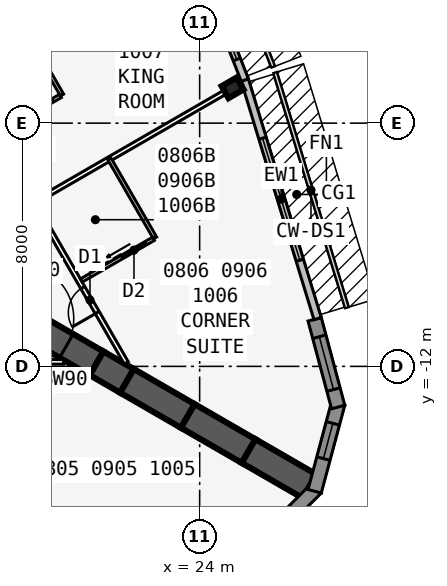
"""IFC4 building model, lengths in metres.
Left out: names, types, materials, properties, quantities, classifications, styles, units other than length and angle.
Written with IfcOpenShell. Run it as: python <this file> out.ifc"""

import sys

from ifc_helpers import new_model, si_unit, direction, frame, frame_2d, origin, origin_2d, place, context, subcontext, project, spatial, polyline, rectangle, i_section, outline, extrude, element, fill, save


model = new_model("IFC4")
c1 = context("Model", 3, precision=1e-05, world=origin(), true_north=direction((0.0, 1.0)))
c2 = subcontext(c1, "Body", "Model", "MODEL_VIEW")
j1 = project(units=[si_unit("LENGTHUNIT", "METRE"), si_unit("PLANEANGLEUNIT", "RADIAN")], contexts=[c1])
p1 = place(None, origin())
s1 = spatial("IfcSite", under=j1, at=p1, CompositionType="ELEMENT")
p2 = place(p1, origin())
s2 = spatial("IfcBuilding", under=s1, at=p2, CompositionType="ELEMENT")
p3 = place(p2, frame((0.0, 0.0, 38.7)))
s3 = spatial("IfcBuildingStorey", under=s2, at=p3, CompositionType="ELEMENT", Elevation=38.7)
p4 = place(p3, frame((16.5, -9.526, 0.0), z_axis=(0.0, 0.0, 1.0), x_axis=(0.866031398331, -0.499989616998, 0.0)))
e1 = element("IfcWall", 1, at=p4, inside=s3, PredefinedType="SHEAR", context=c2, shape_type="SweptSolid", body=[
    extrude(rectangle(XDim=4.746, YDim=0.9, at=frame_2d((2.373, 0.0))), origin(), (0.0, 0.0, 1.0), 3.4),
])
p5 = place(p4, frame((1.8, 0.0, 0.0)))
e2 = element("IfcOpeningElement", 2, at=p5, cuts=e1, PredefinedType="OPENING", context=c2, shape_type="SweptSolid", body=[
    extrude(rectangle(XDim=1.8, YDim=2.13, at=frame_2d((0.9, 1.065))), frame((0.0, 0.46, 0.0), z_axis=(0.0, -1.0, 0.0), x_axis=(1.0, 0.0, 0.0)), (0.0, 0.0, 1.0), 0.92),
])
p6 = place(p3, frame((20.61, -11.899, 0.0), z_axis=(0.0, 0.0, 1.0), x_axis=(0.866009537788, -0.500027479704, 0.0)))
e3 = element("IfcWall", 3, at=p6, inside=s3, PredefinedType="SHEAR", context=c2, shape_type="SweptSolid", body=[
    extrude(rectangle(XDim=1.155, YDim=0.9, at=frame_2d((0.577, 0.0))), origin(), (0.0, 0.0, 1.0), 3.4),
])
for number, where, z_axis, x_axis in (
    (4, (21.61, -12.477, 0.0), (0.0, 0.0, 1.0), (0.866, -0.5, 0.0)),
    (5, (23.61, -13.631, 0.0), (0.0, 0.0, 1.0), (0.866, -0.5, 0.0)),
    (6, (25.61, -14.786, 0.0), (0.0, 0.0, 1.0), (0.866, -0.5, 0.0)),
):
    element("IfcWall", number, at=place(p3, frame(where, z_axis=z_axis, x_axis=x_axis)), inside=s3, PredefinedType="SHEAR", context=c2, shape_type="SweptSolid", body=[
        extrude(rectangle(XDim=2.309, YDim=0.9, at=frame_2d((1.155, 0.0))), origin(), (0.0, 0.0, 1.0), 3.4),
    ])
p7 = place(p3, frame((25.083, -2.839, 0.0), z_axis=(0.0, 0.0, 1.0), x_axis=(-0.5, 0.866025403784, 0.0)))
e7 = element("IfcColumn", 7, at=p7, inside=s3, PredefinedType="COLUMN", context=c2, shape_type="SweptSolid", body=[
    extrude(i_section(OverallWidth=0.455, OverallDepth=0.569, WebThickness=0.078, FlangeThickness=0.125, at=origin_2d()), origin(), (0.0, 0.0, 1.0), 3.4),
])
p8 = place(p3, frame((25.728, -18.12, 0.0), z_axis=(0.0, 0.0, 1.0), x_axis=(0.707025086683, 0.707188466253, 0.0)))
e8 = element("IfcWall", 8, at=p8, inside=s3, PredefinedType="SOLIDWALL", context=c2, shape_type="SweptSolid", body=[
    extrude(outline(polyline([(2.989, 0.225), (2.93, 0.225), (2.438, 0.093), (2.402, 0.225), (0.0, 0.225), (0.0, -0.225), (2.989, -0.225), (2.989, 0.225)])), origin(), (0.0, 0.0, 1.0), 3.235),
])
p9 = place(p8, frame((0.676, 0.0, 0.45)))
e9 = element("IfcOpeningElement", 9, at=p9, cuts=e8, PredefinedType="OPENING", context=c2, shape_type="SweptSolid", body=[
    extrude(rectangle(XDim=1.2, YDim=2.4, at=frame_2d((0.6, 1.2))), frame((0.0, 0.235, 0.0), z_axis=(0.0, -1.0, 0.0), x_axis=(1.0, 0.0, 0.0)), (0.0, 0.0, 1.0), 0.47),
])
p10 = place(p3, frame((27.783, -16.108, 0.0), z_axis=(0.0, 0.0, 1.0), x_axis=(0.258801419081, 0.965930548995, 0.0)))
e10 = element("IfcWall", 10, at=p10, inside=s3, PredefinedType="SOLIDWALL", context=c2, shape_type="SweptSolid", body=[
    extrude(outline(polyline([(2.989, 0.225), (0.586, 0.225), (0.551, 0.093), (0.06, 0.225), (0.0, 0.225), (0.0, -0.225), (2.989, -0.225), (2.989, 0.225)])), origin(), (0.0, 0.0, 1.0), 3.235),
])
p11 = place(p10, frame((1.113, 0.0, 0.45)))
e11 = element("IfcOpeningElement", 11, at=p11, cuts=e10, PredefinedType="OPENING", context=c2, shape_type="SweptSolid", body=[
    extrude(rectangle(XDim=1.2, YDim=2.4, at=frame_2d((0.6, 1.2))), frame((0.0, 0.235, 0.0), z_axis=(0.0, -1.0, 0.0), x_axis=(1.0, 0.0, 0.0)), (0.0, 0.0, 1.0), 0.47),
])
p12 = place(p3, frame((28.556, -13.337, 0.0), z_axis=(0.0, 0.0, 1.0), x_axis=(-0.258780998834, 0.965936019953, 0.0)))
e12 = element("IfcWall", 12, at=p12, inside=s3, PredefinedType="SOLIDWALL", context=c2, shape_type="SweptSolid", body=[
    extrude(rectangle(XDim=2.989, YDim=0.45, at=frame_2d((1.494, 0.0))), origin(), (0.0, 0.0, 1.0), 3.235),
])
p13 = place(p12, frame((0.594, 0.0, 0.45)))
e13 = element("IfcOpeningElement", 13, at=p13, cuts=e12, PredefinedType="OPENING", context=c2, shape_type="SweptSolid", body=[
    extrude(rectangle(XDim=1.8, YDim=2.4, at=frame_2d((0.9, 1.2))), frame((0.0, 0.235, 0.0), z_axis=(0.0, -1.0, 0.0), x_axis=(1.0, 0.0, 0.0)), (0.0, 0.0, 1.0), 0.47),
])
p14 = place(p3, frame((27.88, -10.429, 0.0), z_axis=(0.0, 0.0, 1.0), x_axis=(-0.2919790669, 0.956424709265, 0.0)))
e14 = element("IfcWall", 14, at=p14, inside=s3, PredefinedType="STANDARD", context=c2, shape_type="SweptSolid", body=[
    extrude(rectangle(XDim=8.211, YDim=0.25, at=frame_2d((4.105, 0.0))), origin(), (0.0, 0.0, 1.0), 3.235),
])
p15 = place(p14, frame((2.006, 0.0, 0.45)))
e15 = element("IfcOpeningElement", 15, at=p15, cuts=e14, PredefinedType="OPENING", context=c2, shape_type="SweptSolid", body=[
    extrude(rectangle(XDim=4.2, YDim=2.4, at=frame_2d((2.1, 1.2))), frame((0.0, 0.135, 0.0), z_axis=(0.0, -1.0, 0.0), x_axis=(1.0, 0.0, 0.0)), (0.0, 0.0, 1.0), 0.27),
])
p16 = place(p3, frame((25.486, -2.584, 0.0), z_axis=(0.0, 0.0, 1.0), x_axis=(-0.364013463868, 0.931393685894, 0.0)))
e16 = element("IfcWall", 16, at=p16, inside=s3, PredefinedType="STANDARD", context=c2, shape_type="SweptSolid", body=[
    extrude(rectangle(XDim=5.058, YDim=0.25, at=frame_2d((2.529, 0.0))), origin(), (0.0, 0.0, 1.0), 3.235),
])
p17 = place(p16, frame((0.729, 0.0, 0.45)))
e17 = element("IfcOpeningElement", 17, at=p17, cuts=e16, PredefinedType="OPENING", context=c2, shape_type="SweptSolid", body=[
    extrude(rectangle(XDim=3.6, YDim=2.4, at=frame_2d((1.8, 1.2))), frame((0.0, 0.135, 0.0), z_axis=(0.0, -1.0, 0.0), x_axis=(1.0, 0.0, 0.0)), (0.0, 0.0, 1.0), 0.27),
])
p18 = place(p3, frame((-19.527, -11.851, 0.0), z_axis=(0.0, 0.0, 1.0), x_axis=(1.0, 0.0, 0.0)))
e18 = element("IfcWall", 18, at=p18, inside=s3, PredefinedType="PARTITIONING", context=c2, shape_type="SweptSolid", body=[
    extrude(rectangle(XDim=39.054, YDim=0.15, at=frame_2d((19.527, 0.0))), origin(), (0.0, 0.0, 1.0), 3.235),
])
p19 = place(p18, frame((0.352, 0.0, 0.0)))
e19 = element("IfcOpeningElement", 19, at=p19, cuts=e18, PredefinedType="OPENING", context=c2, shape_type="SweptSolid", body=[
    extrude(rectangle(XDim=0.95, YDim=2.13, at=frame_2d((0.475, 1.065))), frame((0.0, 0.085, 0.0), z_axis=(0.0, -1.0, 0.0), x_axis=(1.0, 0.0, 0.0)), (0.0, 0.0, 1.0), 0.17),
])
p20 = place(p18, frame((5.352, 0.0, 0.0)))
e20 = element("IfcOpeningElement", 20, at=p20, cuts=e18, PredefinedType="OPENING", context=c2, shape_type="SweptSolid", body=[
    extrude(rectangle(XDim=0.95, YDim=2.13, at=frame_2d((0.475, 1.065))), frame((0.0, 0.085, 0.0), z_axis=(0.0, -1.0, 0.0), x_axis=(1.0, 0.0, 0.0)), (0.0, 0.0, 1.0), 0.17),
])
p21 = place(p18, frame((12.752, 0.0, 0.0)))
e21 = element("IfcOpeningElement", 21, at=p21, cuts=e18, PredefinedType="OPENING", context=c2, shape_type="SweptSolid", body=[
    extrude(rectangle(XDim=0.95, YDim=2.13, at=frame_2d((0.475, 1.065))), frame((0.0, 0.085, 0.0), z_axis=(0.0, -1.0, 0.0), x_axis=(1.0, 0.0, 0.0)), (0.0, 0.0, 1.0), 0.17),
])
p22 = place(p18, frame((21.527, 0.0, 0.0)))
e22 = element("IfcOpeningElement", 22, at=p22, cuts=e18, PredefinedType="OPENING", context=c2, shape_type="SweptSolid", body=[
    extrude(rectangle(XDim=1.0, YDim=2.13, at=frame_2d((0.5, 1.065))), frame((0.0, 0.085, 0.0), z_axis=(0.0, -1.0, 0.0), x_axis=(1.0, 0.0, 0.0)), (0.0, 0.0, 1.0), 0.17),
])
p23 = place(p18, frame((25.952, 0.0, 0.0)))
e23 = element("IfcOpeningElement", 23, at=p23, cuts=e18, PredefinedType="OPENING", context=c2, shape_type="SweptSolid", body=[
    extrude(rectangle(XDim=0.95, YDim=2.13, at=frame_2d((0.475, 1.065))), frame((0.0, 0.085, 0.0), z_axis=(0.0, -1.0, 0.0), x_axis=(1.0, 0.0, 0.0)), (0.0, 0.0, 1.0), 0.17),
])
p24 = place(p18, frame((36.546, 0.0, 0.0)))
e24 = element("IfcOpeningElement", 24, at=p24, cuts=e18, PredefinedType="OPENING", context=c2, shape_type="SweptSolid", body=[
    extrude(rectangle(XDim=0.95, YDim=2.13, at=frame_2d((0.475, 1.065))), frame((0.0, 0.085, 0.0), z_axis=(0.0, -1.0, 0.0), x_axis=(1.0, 0.0, 0.0)), (0.0, 0.0, 1.0), 0.17),
])
p25 = place(p3, frame((21.586, -11.885, 0.0), z_axis=(0.0, 0.0, 1.0), x_axis=(-0.500001915564, 0.86602429783, 0.0)))
e25 = element("IfcWall", 25, at=p25, inside=s3, PredefinedType="PARTITIONING", context=c2, shape_type="SweptSolid", body=[
    extrude(rectangle(XDim=42.172, YDim=0.15, at=frame_2d((21.086, 0.0))), origin(), (0.0, 0.0, 1.0), 3.235),
])
p26 = place(p25, frame((1.911, 0.0, 0.0)))
e26 = element("IfcOpeningElement", 26, at=p26, cuts=e25, PredefinedType="OPENING", context=c2, shape_type="SweptSolid", body=[
    extrude(rectangle(XDim=0.95, YDim=2.13, at=frame_2d((0.475, 1.065))), frame((0.0, 0.085, 0.0), z_axis=(0.0, -1.0, 0.0), x_axis=(1.0, 0.0, 0.0)), (0.0, 0.0, 1.0), 0.17),
])
p27 = place(p25, frame((7.511, 0.0, 0.0)))
e27 = element("IfcOpeningElement", 27, at=p27, cuts=e25, PredefinedType="OPENING", context=c2, shape_type="SweptSolid", body=[
    extrude(rectangle(XDim=0.95, YDim=2.13, at=frame_2d((0.475, 1.065))), frame((0.0, 0.085, 0.0), z_axis=(0.0, -1.0, 0.0), x_axis=(1.0, 0.0, 0.0)), (0.0, 0.0, 1.0), 0.17),
])
p28 = place(p25, frame((13.711, 0.0, 0.0)))
e28 = element("IfcOpeningElement", 28, at=p28, cuts=e25, PredefinedType="OPENING", context=c2, shape_type="SweptSolid", body=[
    extrude(rectangle(XDim=0.95, YDim=2.13, at=frame_2d((0.475, 1.065))), frame((0.0, 0.085, 0.0), z_axis=(0.0, -1.0, 0.0), x_axis=(1.0, 0.0, 0.0)), (0.0, 0.0, 1.0), 0.17),
])
p29 = place(p25, frame((21.911, 0.0, 0.0)))
e29 = element("IfcOpeningElement", 29, at=p29, cuts=e25, PredefinedType="OPENING", context=c2, shape_type="SweptSolid", body=[
    extrude(rectangle(XDim=0.95, YDim=2.13, at=frame_2d((0.475, 1.065))), frame((0.0, 0.085, 0.0), z_axis=(0.0, -1.0, 0.0), x_axis=(1.0, 0.0, 0.0)), (0.0, 0.0, 1.0), 0.17),
])
p30 = place(p25, frame((28.711, 0.0, 0.0)))
e30 = element("IfcOpeningElement", 30, at=p30, cuts=e25, PredefinedType="OPENING", context=c2, shape_type="SweptSolid", body=[
    extrude(rectangle(XDim=0.95, YDim=2.13, at=frame_2d((0.475, 1.065))), frame((0.0, 0.085, 0.0), z_axis=(0.0, -1.0, 0.0), x_axis=(1.0, 0.0, 0.0)), (0.0, 0.0, 1.0), 0.17),
])
p31 = place(p25, frame((31.911, 0.0, 0.0)))
e31 = element("IfcOpeningElement", 31, at=p31, cuts=e25, PredefinedType="OPENING", context=c2, shape_type="SweptSolid", body=[
    extrude(rectangle(XDim=0.95, YDim=2.13, at=frame_2d((0.475, 1.065))), frame((0.0, 0.085, 0.0), z_axis=(0.0, -1.0, 0.0), x_axis=(1.0, 0.0, 0.0)), (0.0, 0.0, 1.0), 0.17),
])
p32 = place(p25, frame((39.311, 0.0, 0.0)))
e32 = element("IfcOpeningElement", 32, at=p32, cuts=e25, PredefinedType="OPENING", context=c2, shape_type="SweptSolid", body=[
    extrude(rectangle(XDim=0.95, YDim=2.13, at=frame_2d((0.475, 1.065))), frame((0.0, 0.085, 0.0), z_axis=(0.0, -1.0, 0.0), x_axis=(1.0, 0.0, 0.0)), (0.0, 0.0, 1.0), 0.17),
])
p33 = place(p3, frame((18.608, -6.577, 0.0), z_axis=(0.0, 0.0, 1.0), x_axis=(0.866034818847, 0.499983692279, 0.0)))
e33 = element("IfcWall", 33, at=p33, inside=s3, PredefinedType="PARTITIONING", context=c2, shape_type="SweptSolid", body=[
    extrude(rectangle(XDim=7.82, YDim=0.15, at=frame_2d((3.91, 0.0))), origin(), (0.0, 0.0, 1.0), 2.389),
])
p34 = place(p3, frame((16.108, -2.247, 0.0), z_axis=(0.0, 0.0, 1.0), x_axis=(0.866018881988, 0.500011295912, 0.0)))
e34 = element("IfcWall", 34, at=p34, inside=s3, PredefinedType="PARTITIONING", context=c2, shape_type="SweptSolid", body=[
    extrude(rectangle(XDim=8.585, YDim=0.15, at=frame_2d((4.292, 0.0))), origin(), (0.0, 0.0, 1.0), 2.389),
])
p35 = place(p3, frame((22.533, -7.775, 0.0), z_axis=(0.0, 0.0, 1.0), x_axis=(-0.499990139034, 0.866031096941, 0.0)))
e35 = element("IfcWall", 35, at=p35, inside=s3, PredefinedType="PLUMBINGWALL", context=c2, shape_type="SweptSolid", body=[
    extrude(rectangle(XDim=3.0, YDim=0.12, at=frame_2d((1.5, 0.0))), origin(), (0.0, 0.0, 1.0), 3.235),
])
p36 = place(p3, frame((20.108, -9.175, 0.0), z_axis=(0.0, 0.0, 1.0), x_axis=(0.866035715982, 0.499982138324, 0.0)))
e36 = element("IfcWall", 36, at=p36, inside=s3, PredefinedType="PLUMBINGWALL", context=c2, shape_type="SweptSolid", body=[
    extrude(rectangle(XDim=2.74, YDim=0.12, at=frame_2d((1.37, 0.0))), origin(), (0.0, 0.0, 1.0), 3.235),
])
p37 = place(p36, frame((1.55, 0.0, 0.0)))
e37 = element("IfcOpeningElement", 37, at=p37, cuts=e36, PredefinedType="OPENING", context=c2, shape_type="SweptSolid", body=[
    extrude(rectangle(XDim=0.9, YDim=2.13, at=frame_2d((0.45, 1.065))), frame((0.0, 0.07, 0.0), z_axis=(0.0, -1.0, 0.0), x_axis=(1.0, 0.0, 0.0)), (0.0, 0.0, 1.0), 0.14),
])
p38 = place(p3, frame((19.473, -3.076, 0.0), z_axis=(0.0, 0.0, 1.0), x_axis=(-0.499957262057, 0.866050077142, 0.0)))
e38 = element("IfcWall", 38, at=p38, inside=s3, PredefinedType="PLUMBINGWALL", context=c2, shape_type="SweptSolid", body=[
    extrude(rectangle(XDim=2.4, YDim=0.12, at=frame_2d((1.2, 0.0))), origin(), (0.0, 0.0, 1.0), 3.235),
])
p39 = place(p3, frame((17.308, -4.326, 0.0), z_axis=(0.0, 0.0, 1.0), x_axis=(0.866023955769, 0.500002508028, 0.0)))
e39 = element("IfcWall", 39, at=p39, inside=s3, PredefinedType="PLUMBINGWALL", context=c2, shape_type="SweptSolid", body=[
    extrude(rectangle(XDim=2.44, YDim=0.12, at=frame_2d((1.22, 0.0))), origin(), (0.0, 0.0, 1.0), 3.235),
])
p40 = place(p39, frame((1.25, 0.0, 0.0)))
e40 = element("IfcOpeningElement", 40, at=p40, cuts=e39, PredefinedType="OPENING", context=c2, shape_type="SweptSolid", body=[
    extrude(rectangle(XDim=0.9, YDim=2.13, at=frame_2d((0.45, 1.065))), frame((0.0, 0.07, 0.0), z_axis=(0.0, -1.0, 0.0), x_axis=(1.0, 0.0, 0.0)), (0.0, 0.0, 1.0), 0.14),
])
p41 = place(p11, origin())
e41 = element("IfcWindow", 41, at=p41, inside=s3, PartitioningType="SINGLE_PANEL", PredefinedType="WINDOW", context=c2, shape_type="SweptSolid", body=[
    extrude(rectangle(XDim=1.2, YDim=2.4, at=frame_2d((0.6, 1.2))), frame((0.0, 0.03, 0.0), z_axis=(0.0, -1.0, 0.0), x_axis=(1.0, 0.0, 0.0)), (0.0, 0.0, 1.0), 0.06),
])
fill(e11, e41)
p42 = place(p13, origin())
e42 = element("IfcWindow", 42, at=p42, inside=s3, PartitioningType="SINGLE_PANEL", PredefinedType="WINDOW", context=c2, shape_type="SweptSolid", body=[
    extrude(rectangle(XDim=1.8, YDim=2.4, at=frame_2d((0.9, 1.2))), frame((0.0, 0.03, 0.0), z_axis=(0.0, -1.0, 0.0), x_axis=(1.0, 0.0, 0.0)), (0.0, 0.0, 1.0), 0.06),
])
fill(e13, e42)
p43 = place(p15, origin())
e43 = element("IfcWindow", 43, at=p43, inside=s3, PartitioningType="SINGLE_PANEL", PredefinedType="WINDOW", context=c2, shape_type="SweptSolid", body=[
    extrude(rectangle(XDim=4.2, YDim=2.4, at=frame_2d((2.1, 1.2))), frame((0.0, 0.03, 0.0), z_axis=(0.0, -1.0, 0.0), x_axis=(1.0, 0.0, 0.0)), (0.0, 0.0, 1.0), 0.06),
])
fill(e15, e43)
p44 = place(p17, origin())
e44 = element("IfcWindow", 44, at=p44, inside=s3, PartitioningType="SINGLE_PANEL", PredefinedType="WINDOW", context=c2, shape_type="SweptSolid", body=[
    extrude(rectangle(XDim=3.6, YDim=2.4, at=frame_2d((1.8, 1.2))), frame((0.0, 0.03, 0.0), z_axis=(0.0, -1.0, 0.0), x_axis=(1.0, 0.0, 0.0)), (0.0, 0.0, 1.0), 0.06),
])
fill(e17, e44)
p45 = place(p37, origin())
e45 = element("IfcDoor", 45, at=p45, inside=s3, OperationType="SLIDING_TO_LEFT", PredefinedType="DOOR", context=c2, shape_type="SweptSolid", body=[
    extrude(rectangle(XDim=0.9, YDim=2.13, at=frame_2d((0.45, 1.065))), frame((0.0, 0.025, 0.0), z_axis=(0.0, -1.0, 0.0), x_axis=(1.0, 0.0, 0.0)), (0.0, 0.0, 1.0), 0.05),
])
fill(e37, e45)
p46 = place(p26, origin())
e46 = element("IfcDoor", 46, at=p46, inside=s3, OperationType="SINGLE_SWING_LEFT", PredefinedType="DOOR", context=c2, shape_type="SweptSolid", body=[
    extrude(rectangle(XDim=0.95, YDim=2.13, at=frame_2d((0.475, 1.065))), frame((0.0, 0.025, 0.0), z_axis=(0.0, -1.0, 0.0), x_axis=(1.0, 0.0, 0.0)), (0.0, 0.0, 1.0), 0.05),
])
fill(e26, e46)
p47 = place(p40, origin())
e47 = element("IfcDoor", 47, at=p47, inside=s3, OperationType="SLIDING_TO_LEFT", PredefinedType="DOOR", context=c2, shape_type="SweptSolid", body=[
    extrude(rectangle(XDim=0.9, YDim=2.13, at=frame_2d((0.45, 1.065))), frame((0.0, 0.025, 0.0), z_axis=(0.0, -1.0, 0.0), x_axis=(1.0, 0.0, 0.0)), (0.0, 0.0, 1.0), 0.05),
])
fill(e40, e47)
p48 = place(p5, origin())
e48 = element("IfcDoor", 48, at=p48, inside=s3, OperationType="DOUBLE_DOOR_DOUBLE_SWING", PredefinedType="DOOR", context=c2, shape_type="SweptSolid", body=[
    extrude(rectangle(XDim=1.8, YDim=2.13, at=frame_2d((0.9, 1.065))), frame((0.0, 0.025, 0.0), z_axis=(0.0, -1.0, 0.0), x_axis=(1.0, 0.0, 0.0)), (0.0, 0.0, 1.0), 0.05),
])
fill(e2, e48)
save(model, sys.argv[1])
